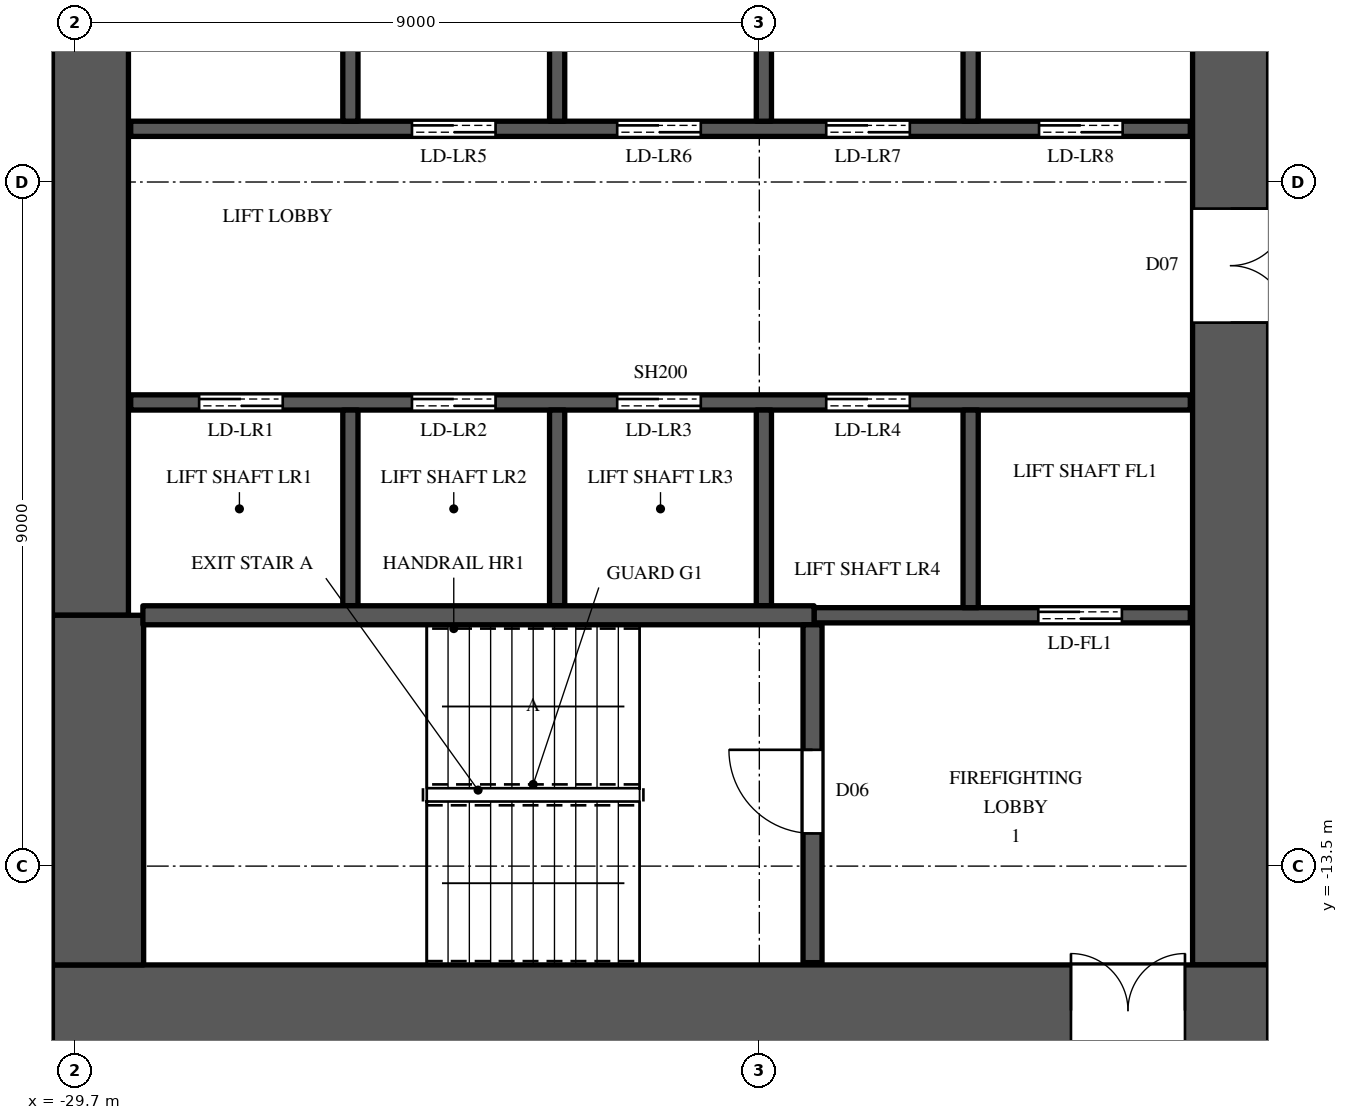
"""IFC4 building model, lengths in metres.
Left out: names, types, materials, properties, quantities, classifications, styles, units other than length and angle.
Written with IfcOpenShell. Run it as: python <this file> out.ifc"""

import sys

from ifc_helpers import new_model, si_unit, direction, frame, frame_2d, origin, place, context, subcontext, project, spatial, rectangle, extrude, element, fill, save


model = new_model("IFC4")
c1 = context("Model", 3, precision=1e-05, world=origin(), true_north=direction((0.0, 1.0)))
c2 = subcontext(c1, "Body", "Model", "MODEL_VIEW")
j1 = project(units=[si_unit("LENGTHUNIT", "METRE"), si_unit("PLANEANGLEUNIT", "RADIAN")], contexts=[c1])
p1 = place(None, origin())
s1 = spatial("IfcSite", under=j1, at=p1, CompositionType="ELEMENT")
p2 = place(p1, origin())
s2 = spatial("IfcBuilding", under=s1, at=p2, CompositionType="ELEMENT")
p3 = place(p2, frame((0.0, 0.0, 73.5)))
s3 = spatial("IfcBuildingStorey", under=s2, at=p3, CompositionType="ELEMENT", Elevation=73.5)
p4 = place(p3, frame((-30.0, -15.4, 0.0), z_axis=(0.0, 0.0, 1.0), x_axis=(1.0, 0.0, 0.0)))
e1 = element("IfcWall", 1, at=p4, inside=s3, PredefinedType="SHEAR", context=c2, shape_type="SweptSolid", body=[
    extrude(rectangle(XDim=16.0, YDim=1.2, at=frame_2d((8.0, 0.0))), origin(), (0.0, 0.0, 1.0), 3.6),
])
p5 = place(p4, frame((13.4, 0.0, 0.0)))
e2 = element("IfcOpeningElement", 2, at=p5, cuts=e1, PredefinedType="OPENING", context=c2, shape_type="SweptSolid", body=[
    extrude(rectangle(XDim=1.5, YDim=2.4, at=frame_2d((0.75, 1.2))), frame((0.0, 0.61, 0.0), z_axis=(0.0, -1.0, 0.0), x_axis=(1.0, 0.0, 0.0)), (0.0, 0.0, 1.0), 1.22),
])
p6 = place(p3, frame((-14.5, -14.8, 0.0), z_axis=(0.0, 0.0, 1.0), x_axis=(0.0, 1.0, 0.0)))
e3 = element("IfcWall", 3, at=p6, inside=s3, PredefinedType="SHEAR", context=c2, shape_type="SweptSolid", body=[
    extrude(rectangle(XDim=29.6, YDim=1.0, at=frame_2d((14.8, 0.0))), origin(), (0.0, 0.0, 1.0), 3.6),
])
p7 = place(p6, frame((8.45, 0.0, 0.0)))
e4 = element("IfcOpeningElement", 4, at=p7, cuts=e3, PredefinedType="OPENING", context=c2, shape_type="SweptSolid", body=[
    extrude(rectangle(XDim=1.5, YDim=2.4, at=frame_2d((0.75, 1.2))), frame((0.0, 0.51, 0.0), z_axis=(0.0, -1.0, 0.0), x_axis=(1.0, 0.0, 0.0)), (0.0, 0.0, 1.0), 1.02),
])
p8 = place(p6, frame((19.65, 0.0, 0.0)))
e5 = element("IfcOpeningElement", 5, at=p8, cuts=e3, PredefinedType="OPENING", context=c2, shape_type="SweptSolid", body=[
    extrude(rectangle(XDim=1.5, YDim=2.4, at=frame_2d((0.75, 1.2))), frame((0.0, 0.51, 0.0), z_axis=(0.0, -1.0, 0.0), x_axis=(1.0, 0.0, 0.0)), (0.0, 0.0, 1.0), 1.02),
])
p9 = place(p6, frame((14.5, 0.0, 0.0)))
e6 = element("IfcOpeningElement", 6, at=p9, cuts=e3, PredefinedType="OPENING", context=c2, shape_type="SweptSolid", body=[
    extrude(rectangle(XDim=0.6, YDim=2.0, at=frame_2d((0.3, 1.0))), frame((0.0, 0.51, 0.0), z_axis=(0.0, -1.0, 0.0), x_axis=(1.0, 0.0, 0.0)), (0.0, 0.0, 1.0), 1.02),
])
p10 = place(p3, frame((-29.5, -10.2, 0.0), z_axis=(0.0, 0.0, 1.0), x_axis=(0.0, 1.0, 0.0)))
e7 = element("IfcWall", 7, at=p10, inside=s3, PredefinedType="SHEAR", context=c2, shape_type="SweptSolid", body=[
    extrude(rectangle(XDim=20.4, YDim=1.0, at=frame_2d((10.2, 0.0))), origin(), (0.0, 0.0, 1.0), 3.6),
])
p11 = place(p3, frame((-29.4, -14.8, 0.0), z_axis=(0.0, 0.0, 1.0), x_axis=(0.0, 1.0, 0.0)))
e8 = element("IfcWall", 8, at=p11, inside=s3, PredefinedType="SHEAR", context=c2, shape_type="SweptSolid", body=[
    extrude(rectangle(XDim=4.6, YDim=1.2, at=frame_2d((2.3, 0.0))), origin(), (0.0, 0.0, 1.0), 3.6),
])
p12 = place(p3, frame((-28.97, -7.4, 0.0), z_axis=(0.0, 0.0, 1.0), x_axis=(1.0, 0.0, 0.0)))
e9 = element("IfcWall", 9, at=p12, inside=s3, PredefinedType="SHEAR", context=c2, shape_type="SweptSolid", body=[
    extrude(rectangle(XDim=13.94, YDim=0.2, at=frame_2d((6.97, 0.0))), origin(), (0.0, 0.0, 1.0), 3.3),
])
p13 = place(p12, frame((0.9, 0.0, 0.0)))
e10 = element("IfcOpeningElement", 10, at=p13, cuts=e9, PredefinedType="OPENING", context=c2, shape_type="SweptSolid", body=[
    extrude(rectangle(XDim=1.1, YDim=2.2, at=frame_2d((0.55, 1.1))), frame((0.0, 0.11, 0.0), z_axis=(0.0, -1.0, 0.0), x_axis=(1.0, 0.0, 0.0)), (0.0, 0.0, 1.0), 0.22),
])
p14 = place(p12, frame((3.7, 0.0, 0.0)))
e11 = element("IfcOpeningElement", 11, at=p14, cuts=e9, PredefinedType="OPENING", context=c2, shape_type="SweptSolid", body=[
    extrude(rectangle(XDim=1.1, YDim=2.2, at=frame_2d((0.55, 1.1))), frame((0.0, 0.11, 0.0), z_axis=(0.0, -1.0, 0.0), x_axis=(1.0, 0.0, 0.0)), (0.0, 0.0, 1.0), 0.22),
])
p15 = place(p12, frame((6.4, 0.0, 0.0)))
e12 = element("IfcOpeningElement", 12, at=p15, cuts=e9, PredefinedType="OPENING", context=c2, shape_type="SweptSolid", body=[
    extrude(rectangle(XDim=1.1, YDim=2.2, at=frame_2d((0.55, 1.1))), frame((0.0, 0.11, 0.0), z_axis=(0.0, -1.0, 0.0), x_axis=(1.0, 0.0, 0.0)), (0.0, 0.0, 1.0), 0.22),
])
p16 = place(p12, frame((9.15, 0.0, 0.0)))
e13 = element("IfcOpeningElement", 13, at=p16, cuts=e9, PredefinedType="OPENING", context=c2, shape_type="SweptSolid", body=[
    extrude(rectangle(XDim=1.1, YDim=2.2, at=frame_2d((0.55, 1.1))), frame((0.0, 0.11, 0.0), z_axis=(0.0, -1.0, 0.0), x_axis=(1.0, 0.0, 0.0)), (0.0, 0.0, 1.0), 0.22),
])
p17 = place(p3, frame((-28.97, -3.8, 0.0), z_axis=(0.0, 0.0, 1.0), x_axis=(1.0, 0.0, 0.0)))
e14 = element("IfcWall", 14, at=p17, inside=s3, PredefinedType="SHEAR", context=c2, shape_type="SweptSolid", body=[
    extrude(rectangle(XDim=13.94, YDim=0.2, at=frame_2d((6.97, 0.0))), origin(), (0.0, 0.0, 1.0), 3.3),
])
p18 = place(p17, frame((3.7, 0.0, 0.0)))
e15 = element("IfcOpeningElement", 15, at=p18, cuts=e14, PredefinedType="OPENING", context=c2, shape_type="SweptSolid", body=[
    extrude(rectangle(XDim=1.1, YDim=2.2, at=frame_2d((0.55, 1.1))), frame((0.0, 0.11, 0.0), z_axis=(0.0, -1.0, 0.0), x_axis=(1.0, 0.0, 0.0)), (0.0, 0.0, 1.0), 0.22),
])
p19 = place(p17, frame((6.4, 0.0, 0.0)))
e16 = element("IfcOpeningElement", 16, at=p19, cuts=e14, PredefinedType="OPENING", context=c2, shape_type="SweptSolid", body=[
    extrude(rectangle(XDim=1.1, YDim=2.2, at=frame_2d((0.55, 1.1))), frame((0.0, 0.11, 0.0), z_axis=(0.0, -1.0, 0.0), x_axis=(1.0, 0.0, 0.0)), (0.0, 0.0, 1.0), 0.22),
])
p20 = place(p17, frame((9.15, 0.0, 0.0)))
e17 = element("IfcOpeningElement", 17, at=p20, cuts=e14, PredefinedType="OPENING", context=c2, shape_type="SweptSolid", body=[
    extrude(rectangle(XDim=1.1, YDim=2.2, at=frame_2d((0.55, 1.1))), frame((0.0, 0.11, 0.0), z_axis=(0.0, -1.0, 0.0), x_axis=(1.0, 0.0, 0.0)), (0.0, 0.0, 1.0), 0.22),
])
p21 = place(p17, frame((11.95, 0.0, 0.0)))
e18 = element("IfcOpeningElement", 18, at=p21, cuts=e14, PredefinedType="OPENING", context=c2, shape_type="SweptSolid", body=[
    extrude(rectangle(XDim=1.1, YDim=2.2, at=frame_2d((0.55, 1.1))), frame((0.0, 0.11, 0.0), z_axis=(0.0, -1.0, 0.0), x_axis=(1.0, 0.0, 0.0)), (0.0, 0.0, 1.0), 0.22),
])
p22 = place(p3, frame((-26.08, -10.075, 0.0), z_axis=(0.0, 0.0, 1.0), x_axis=(0.0, 1.0, 0.0)))
e19 = element("IfcWall", 19, at=p22, inside=s3, PredefinedType="SHEAR", context=c2, shape_type="SweptSolid", body=[
    extrude(rectangle(XDim=2.575, YDim=0.2, at=frame_2d((1.288, 0.0))), origin(), (0.0, 0.0, 1.0), 3.6),
])
p23 = place(p3, frame((-26.08, -3.7, 0.0), z_axis=(0.0, 0.0, 1.0), x_axis=(0.0, 1.0, 0.0)))
e20 = element("IfcWall", 20, at=p23, inside=s3, PredefinedType="SHEAR", context=c2, shape_type="SweptSolid", body=[
    extrude(rectangle(XDim=2.6, YDim=0.2, at=frame_2d((1.3, 0.0))), origin(), (0.0, 0.0, 1.0), 3.6),
])
p24 = place(p3, frame((-23.36, -10.075, 0.0), z_axis=(0.0, 0.0, 1.0), x_axis=(0.0, 1.0, 0.0)))
e21 = element("IfcWall", 21, at=p24, inside=s3, PredefinedType="SHEAR", context=c2, shape_type="SweptSolid", body=[
    extrude(rectangle(XDim=2.575, YDim=0.2, at=frame_2d((1.288, 0.0))), origin(), (0.0, 0.0, 1.0), 3.6),
])
p25 = place(p3, frame((-23.36, -3.7, 0.0), z_axis=(0.0, 0.0, 1.0), x_axis=(0.0, 1.0, 0.0)))
e22 = element("IfcWall", 22, at=p25, inside=s3, PredefinedType="SHEAR", context=c2, shape_type="SweptSolid", body=[
    extrude(rectangle(XDim=2.6, YDim=0.2, at=frame_2d((1.3, 0.0))), origin(), (0.0, 0.0, 1.0), 3.6),
])
p26 = place(p3, frame((-20.64, -10.075, 0.0), z_axis=(0.0, 0.0, 1.0), x_axis=(0.0, 1.0, 0.0)))
e23 = element("IfcWall", 23, at=p26, inside=s3, PredefinedType="SHEAR", context=c2, shape_type="SweptSolid", body=[
    extrude(rectangle(XDim=2.575, YDim=0.2, at=frame_2d((1.288, 0.0))), origin(), (0.0, 0.0, 1.0), 3.6),
])
p27 = place(p3, frame((-20.64, -3.7, 0.0), z_axis=(0.0, 0.0, 1.0), x_axis=(0.0, 1.0, 0.0)))
e24 = element("IfcWall", 24, at=p27, inside=s3, PredefinedType="SHEAR", context=c2, shape_type="SweptSolid", body=[
    extrude(rectangle(XDim=2.6, YDim=0.2, at=frame_2d((1.3, 0.0))), origin(), (0.0, 0.0, 1.0), 3.6),
])
p28 = place(p3, frame((-19.98, -10.2, 0.0), z_axis=(0.0, 0.0, 1.0), x_axis=(1.0, 0.0, 0.0)))
e25 = element("IfcWall", 25, at=p28, inside=s3, PredefinedType="SHEAR", context=c2, shape_type="SweptSolid", body=[
    extrude(rectangle(XDim=4.95, YDim=0.2, at=frame_2d((2.475, 0.0))), origin(), (0.0, 0.0, 1.0), 3.3),
])
p29 = place(p28, frame((2.95, 0.0, 0.0)))
e26 = element("IfcOpeningElement", 26, at=p29, cuts=e25, PredefinedType="OPENING", context=c2, shape_type="SweptSolid", body=[
    extrude(rectangle(XDim=1.1, YDim=2.2, at=frame_2d((0.55, 1.1))), frame((0.0, 0.11, 0.0), z_axis=(0.0, -1.0, 0.0), x_axis=(1.0, 0.0, 0.0)), (0.0, 0.0, 1.0), 0.22),
])
p30 = place(p3, frame((-17.92, -10.1, 0.0), z_axis=(0.0, 0.0, 1.0), x_axis=(0.0, 1.0, 0.0)))
e27 = element("IfcWall", 27, at=p30, inside=s3, PredefinedType="SHEAR", context=c2, shape_type="SweptSolid", body=[
    extrude(rectangle(XDim=2.6, YDim=0.2, at=frame_2d((1.3, 0.0))), origin(), (0.0, 0.0, 1.0), 3.6),
])
p31 = place(p3, frame((-17.92, -3.7, 0.0), z_axis=(0.0, 0.0, 1.0), x_axis=(0.0, 1.0, 0.0)))
e28 = element("IfcWall", 28, at=p31, inside=s3, PredefinedType="SHEAR", context=c2, shape_type="SweptSolid", body=[
    extrude(rectangle(XDim=2.6, YDim=0.2, at=frame_2d((1.3, 0.0))), origin(), (0.0, 0.0, 1.0), 3.6),
])
p32 = place(p3, frame((-28.81, -10.2, 0.0), z_axis=(0.0, 0.0, 1.0), x_axis=(1.0, 0.0, 0.0)))
e29 = element("IfcWall", 29, at=p32, inside=s3, PredefinedType="SHEAR", context=c2, shape_type="SweptSolid", body=[
    extrude(rectangle(XDim=8.83, YDim=0.25, at=frame_2d((4.415, 0.0))), origin(), (0.0, 0.0, 1.0), 3.3),
])
p33 = place(p3, frame((-20.0, -14.77, 0.0), z_axis=(0.0, 0.0, 1.0), x_axis=(0.0, 1.0, 0.0)))
e30 = element("IfcWall", 30, at=p33, inside=s3, PredefinedType="SHEAR", context=c2, shape_type="SweptSolid", body=[
    extrude(rectangle(XDim=4.445, YDim=0.25, at=frame_2d((2.223, 0.0))), origin(), (0.0, 0.0, 1.0), 3.3),
])
p34 = place(p33, frame((1.7, 0.0, 0.0)))
e31 = element("IfcOpeningElement", 31, at=p34, cuts=e30, PredefinedType="OPENING", context=c2, shape_type="SweptSolid", body=[
    extrude(rectangle(XDim=1.1, YDim=2.2, at=frame_2d((0.55, 1.1))), frame((0.0, 0.135, 0.0), z_axis=(0.0, -1.0, 0.0), x_axis=(1.0, 0.0, 0.0)), (0.0, 0.0, 1.0), 0.27),
])
p35 = place(p34, origin())
e32 = element("IfcDoor", 32, at=p35, inside=s3, OperationType="SINGLE_SWING_RIGHT", PredefinedType="DOOR", context=c2, shape_type="SweptSolid", body=[
    extrude(rectangle(XDim=1.1, YDim=2.2, at=frame_2d((0.55, 1.1))), frame((0.0, 0.025, 0.0), z_axis=(0.0, -1.0, 0.0), x_axis=(1.0, 0.0, 0.0)), (0.0, 0.0, 1.0), 0.05),
])
fill(e31, e32)
p36 = place(p13, origin())
e33 = element("IfcDoor", 33, at=p36, inside=s3, OperationType="DOUBLE_DOOR_SLIDING", PredefinedType="DOOR", context=c2, shape_type="SweptSolid", body=[
    extrude(rectangle(XDim=1.1, YDim=2.2, at=frame_2d((0.55, 1.1))), frame((0.0, 0.025, 0.0), z_axis=(0.0, -1.0, 0.0), x_axis=(1.0, 0.0, 0.0)), (0.0, 0.0, 1.0), 0.05),
])
fill(e10, e33)
p37 = place(p14, origin())
e34 = element("IfcDoor", 34, at=p37, inside=s3, OperationType="DOUBLE_DOOR_SLIDING", PredefinedType="DOOR", context=c2, shape_type="SweptSolid", body=[
    extrude(rectangle(XDim=1.1, YDim=2.2, at=frame_2d((0.55, 1.1))), frame((0.0, 0.025, 0.0), z_axis=(0.0, -1.0, 0.0), x_axis=(1.0, 0.0, 0.0)), (0.0, 0.0, 1.0), 0.05),
])
fill(e11, e34)
p38 = place(p15, origin())
e35 = element("IfcDoor", 35, at=p38, inside=s3, OperationType="DOUBLE_DOOR_SLIDING", PredefinedType="DOOR", context=c2, shape_type="SweptSolid", body=[
    extrude(rectangle(XDim=1.1, YDim=2.2, at=frame_2d((0.55, 1.1))), frame((0.0, 0.025, 0.0), z_axis=(0.0, -1.0, 0.0), x_axis=(1.0, 0.0, 0.0)), (0.0, 0.0, 1.0), 0.05),
])
fill(e12, e35)
p39 = place(p16, origin())
e36 = element("IfcDoor", 36, at=p39, inside=s3, OperationType="DOUBLE_DOOR_SLIDING", PredefinedType="DOOR", context=c2, shape_type="SweptSolid", body=[
    extrude(rectangle(XDim=1.1, YDim=2.2, at=frame_2d((0.55, 1.1))), frame((0.0, 0.025, 0.0), z_axis=(0.0, -1.0, 0.0), x_axis=(1.0, 0.0, 0.0)), (0.0, 0.0, 1.0), 0.05),
])
fill(e13, e36)
p40 = place(p29, origin())
e37 = element("IfcDoor", 37, at=p40, inside=s3, OperationType="DOUBLE_DOOR_SLIDING", PredefinedType="DOOR", context=c2, shape_type="SweptSolid", body=[
    extrude(rectangle(XDim=1.1, YDim=2.2, at=frame_2d((0.55, 1.1))), frame((0.0, 0.025, 0.0), z_axis=(0.0, -1.0, 0.0), x_axis=(1.0, 0.0, 0.0)), (0.0, 0.0, 1.0), 0.05),
])
fill(e26, e37)
p41 = place(p18, origin())
e38 = element("IfcDoor", 38, at=p41, inside=s3, OperationType="DOUBLE_DOOR_SLIDING", PredefinedType="DOOR", context=c2, shape_type="SweptSolid", body=[
    extrude(rectangle(XDim=1.1, YDim=2.2, at=frame_2d((0.55, 1.1))), frame((0.0, 0.025, 0.0), z_axis=(0.0, -1.0, 0.0), x_axis=(1.0, 0.0, 0.0)), (0.0, 0.0, 1.0), 0.05),
])
fill(e15, e38)
p42 = place(p19, origin())
e39 = element("IfcDoor", 39, at=p42, inside=s3, OperationType="DOUBLE_DOOR_SLIDING", PredefinedType="DOOR", context=c2, shape_type="SweptSolid", body=[
    extrude(rectangle(XDim=1.1, YDim=2.2, at=frame_2d((0.55, 1.1))), frame((0.0, 0.025, 0.0), z_axis=(0.0, -1.0, 0.0), x_axis=(1.0, 0.0, 0.0)), (0.0, 0.0, 1.0), 0.05),
])
fill(e16, e39)
p43 = place(p20, origin())
e40 = element("IfcDoor", 40, at=p43, inside=s3, OperationType="DOUBLE_DOOR_SLIDING", PredefinedType="DOOR", context=c2, shape_type="SweptSolid", body=[
    extrude(rectangle(XDim=1.1, YDim=2.2, at=frame_2d((0.55, 1.1))), frame((0.0, 0.025, 0.0), z_axis=(0.0, -1.0, 0.0), x_axis=(1.0, 0.0, 0.0)), (0.0, 0.0, 1.0), 0.05),
])
fill(e17, e40)
p44 = place(p21, origin())
e41 = element("IfcDoor", 41, at=p44, inside=s3, OperationType="DOUBLE_DOOR_SLIDING", PredefinedType="DOOR", context=c2, shape_type="SweptSolid", body=[
    extrude(rectangle(XDim=1.1, YDim=2.2, at=frame_2d((0.55, 1.1))), frame((0.0, 0.025, 0.0), z_axis=(0.0, -1.0, 0.0), x_axis=(1.0, 0.0, 0.0)), (0.0, 0.0, 1.0), 0.05),
])
fill(e18, e41)
p45 = place(p5, origin())
e42 = element("IfcDoor", 42, at=p45, inside=s3, OperationType="DOUBLE_DOOR_SINGLE_SWING", PredefinedType="DOOR", context=c2, shape_type="SweptSolid", body=[
    extrude(rectangle(XDim=1.5, YDim=2.4, at=frame_2d((0.75, 1.2))), frame((0.0, 0.025, 0.0), z_axis=(0.0, -1.0, 0.0), x_axis=(1.0, 0.0, 0.0)), (0.0, 0.0, 1.0), 0.05),
])
fill(e2, e42)
p46 = place(p7, origin())
e43 = element("IfcDoor", 43, at=p46, inside=s3, OperationType="DOUBLE_DOOR_SINGLE_SWING", PredefinedType="DOOR", context=c2, shape_type="SweptSolid", body=[
    extrude(rectangle(XDim=1.5, YDim=2.4, at=frame_2d((0.75, 1.2))), frame((0.0, -0.445, 0.0), z_axis=(0.0, -1.0, 0.0), x_axis=(1.0, 0.0, 0.0)), (0.0, 0.0, 1.0), 0.05),
])
fill(e4, e43)
save(model, sys.argv[1])
